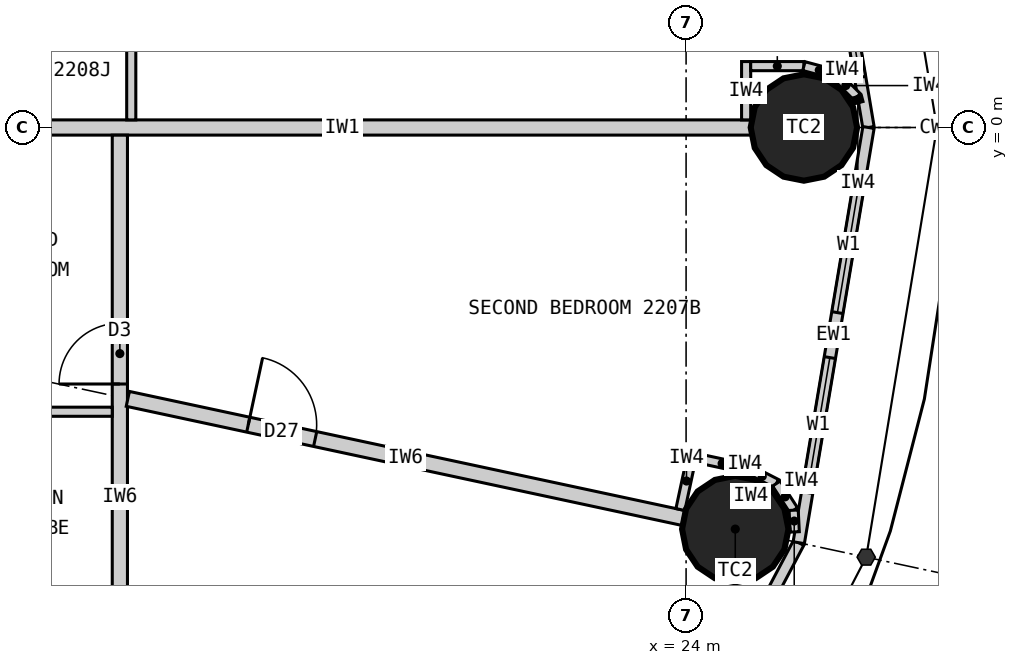
"""IFC4 building model, lengths in metres.
Left out: names, types, materials, properties, quantities, classifications, styles, units other than length and angle.
Written with IfcOpenShell. Run it as: python <this file> out.ifc"""

import sys

from ifc_helpers import new_model, si_unit, direction, frame, frame_2d, origin, origin_2d, place, context, subcontext, project, spatial, rectangle, circle, extrude, element, fill, save


model = new_model("IFC4")
c1 = context("Model", 3, precision=1e-05, world=origin(), true_north=direction((0.0, 1.0)))
c2 = subcontext(c1, "Body", "Model", "MODEL_VIEW")
j1 = project(units=[si_unit("LENGTHUNIT", "METRE"), si_unit("PLANEANGLEUNIT", "RADIAN")], contexts=[c1])
p1 = place(None, origin())
s1 = spatial("IfcSite", under=j1, at=p1, CompositionType="ELEMENT")
p2 = place(p1, origin())
s2 = spatial("IfcBuilding", under=s1, at=p2, CompositionType="ELEMENT")
p3 = place(p2, frame((0.0, 0.0, 87.0)))
s3 = spatial("IfcBuildingStorey", under=s2, at=p3, CompositionType="ELEMENT", Elevation=87.0)
for number, where, z_axis, x_axis in (
    (1, (25.55, 0.0, 0.0), (0.0, 0.0, 1.0), (1.0, 0.0, 0.0)),
    (2, (24.647, -5.283, 0.0), (0.0, 0.0, 1.0), (1.0, 0.0, 0.0)),
):
    element("IfcColumn", number, at=place(p3, frame(where, z_axis=z_axis, x_axis=x_axis)), inside=s3, PredefinedType="COLUMN", context=c2, shape_type="SweptSolid", body=[
        extrude(circle(Radius=0.7, at=origin_2d()), origin(), (0.0, 0.0, 1.0), 3.3),
    ])
p4 = place(p3, frame((26.4, 0.0, 0.0), z_axis=(0.0, 0.0, 1.0), x_axis=(-0.165642551694, 0.986185857264, 0.0)))
e3 = element("IfcWall", 3, at=p4, inside=s3, PredefinedType="ELEMENTEDWALL", context=c2, shape_type="SweptSolid", body=[
    extrude(rectangle(XDim=5.539, YDim=0.15, at=frame_2d((2.77, 0.0))), origin(), (0.0, 0.0, 1.0), 3.12),
])
p5 = place(p4, frame((0.669, 0.0, 0.9)))
e4 = element("IfcOpeningElement", 4, at=p5, cuts=e3, PredefinedType="OPENING", context=c2, shape_type="SweptSolid", body=[
    extrude(rectangle(XDim=1.8, YDim=1.9, at=frame_2d((0.9, 0.95))), frame((0.0, 0.085, 0.0), z_axis=(0.0, -1.0, 0.0), x_axis=(1.0, 0.0, 0.0)), (0.0, 0.0, 1.0), 0.17),
])
p6 = place(p4, frame((3.07, 0.0, 0.9)))
e5 = element("IfcOpeningElement", 5, at=p6, cuts=e3, PredefinedType="OPENING", context=c2, shape_type="SweptSolid", body=[
    extrude(rectangle(XDim=1.8, YDim=1.9, at=frame_2d((0.9, 0.95))), frame((0.0, 0.085, 0.0), z_axis=(0.0, -1.0, 0.0), x_axis=(1.0, 0.0, 0.0)), (0.0, 0.0, 1.0), 0.17),
])
p7 = place(p3, frame((22.803, -10.532, 0.0), z_axis=(0.0, 0.0, 1.0), x_axis=(0.467296867008, 0.884100468321, 0.0)))
e6 = element("IfcWall", 6, at=p7, inside=s3, PredefinedType="ELEMENTEDWALL", context=c2, shape_type="SweptSolid", body=[
    extrude(rectangle(XDim=5.734, YDim=0.15, at=frame_2d((2.867, 0.0))), origin(), (0.0, 0.0, 1.0), 3.12),
])
p8 = place(p7, frame((0.767, 0.0, 0.9)))
e7 = element("IfcOpeningElement", 7, at=p8, cuts=e6, PredefinedType="OPENING", context=c2, shape_type="SweptSolid", body=[
    extrude(rectangle(XDim=1.8, YDim=1.9, at=frame_2d((0.9, 0.95))), frame((0.0, 0.085, 0.0), z_axis=(0.0, -1.0, 0.0), x_axis=(1.0, 0.0, 0.0)), (0.0, 0.0, 1.0), 0.17),
])
p9 = place(p7, frame((3.167, 0.0, 0.9)))
e8 = element("IfcOpeningElement", 8, at=p9, cuts=e6, PredefinedType="OPENING", context=c2, shape_type="SweptSolid", body=[
    extrude(rectangle(XDim=1.8, YDim=1.9, at=frame_2d((0.9, 0.95))), frame((0.0, 0.085, 0.0), z_axis=(0.0, -1.0, 0.0), x_axis=(1.0, 0.0, 0.0)), (0.0, 0.0, 1.0), 0.17),
])
p10 = place(p3, frame((25.482, -5.462, 0.0), z_axis=(0.0, 0.0, 1.0), x_axis=(0.165642551694, 0.986185857264, 0.0)))
e9 = element("IfcWall", 9, at=p10, inside=s3, PredefinedType="ELEMENTEDWALL", context=c2, shape_type="SweptSolid", body=[
    extrude(rectangle(XDim=5.539, YDim=0.15, at=frame_2d((2.77, 0.0))), origin(), (0.0, 0.0, 1.0), 3.12),
])
p11 = place(p10, frame((0.669, 0.0, 0.9)))
e10 = element("IfcOpeningElement", 10, at=p11, cuts=e9, PredefinedType="OPENING", context=c2, shape_type="SweptSolid", body=[
    extrude(rectangle(XDim=1.8, YDim=1.9, at=frame_2d((0.9, 0.95))), frame((0.0, 0.085, 0.0), z_axis=(0.0, -1.0, 0.0), x_axis=(1.0, 0.0, 0.0)), (0.0, 0.0, 1.0), 0.17),
])
p12 = place(p10, frame((3.07, 0.0, 0.9)))
e11 = element("IfcOpeningElement", 11, at=p12, cuts=e9, PredefinedType="OPENING", context=c2, shape_type="SweptSolid", body=[
    extrude(rectangle(XDim=1.8, YDim=1.9, at=frame_2d((0.9, 0.95))), frame((0.0, 0.085, 0.0), z_axis=(0.0, -1.0, 0.0), x_axis=(1.0, 0.0, 0.0)), (0.0, 0.0, 1.0), 0.17),
])
p13 = place(p3, frame((14.1, 0.0, 0.0), z_axis=(0.0, 0.0, 1.0), x_axis=(1.0, 0.0, 0.0)))
e12 = element("IfcWall", 12, at=p13, inside=s3, PredefinedType="PARTITIONING", context=c2, shape_type="SweptSolid", body=[
    extrude(rectangle(XDim=10.75, YDim=0.2, at=frame_2d((5.375, 0.0))), origin(), (0.0, 0.0, 1.0), 2.22),
])
p14 = place(p3, frame((16.55, -9.609, 0.0), z_axis=(0.0, 0.0, 1.0), x_axis=(0.0, 1.0, 0.0)))
e13 = element("IfcWall", 13, at=p14, inside=s3, PredefinedType="PARTITIONING", context=c2, shape_type="SweptSolid", body=[
    extrude(rectangle(XDim=9.508, YDim=0.2, at=frame_2d((4.754, 0.0))), origin(), (0.0, 0.0, 1.0), 3.12),
])
p15 = place(p14, frame((6.234, 0.0, 0.0)))
e14 = element("IfcOpeningElement", 14, at=p15, cuts=e13, PredefinedType="OPENING", context=c2, shape_type="SweptSolid", body=[
    extrude(rectangle(XDim=0.8, YDim=2.1, at=frame_2d((0.4, 1.05))), frame((0.0, 0.11, 0.0), z_axis=(0.0, -1.0, 0.0), x_axis=(1.0, 0.0, 0.0)), (0.0, 0.0, 1.0), 0.22),
])
p16 = place(p3, frame((16.655, -3.57, 0.0), z_axis=(0.0, 0.0, 1.0), x_axis=(0.977790461522, -0.209584859557, 0.0)))
e15 = element("IfcWall", 15, at=p16, inside=s3, PredefinedType="PARTITIONING", context=c2, shape_type="SweptSolid", body=[
    extrude(rectangle(XDim=7.474, YDim=0.2, at=frame_2d((3.737, 0.0))), origin(), (0.0, 0.0, 1.0), 2.27),
])
p17 = place(p16, frame((1.621, 0.0, 0.0)))
e16 = element("IfcOpeningElement", 16, at=p17, cuts=e15, PredefinedType="OPENING", context=c2, shape_type="SweptSolid", body=[
    extrude(rectangle(XDim=0.9, YDim=2.1, at=frame_2d((0.45, 1.05))), frame((0.0, 0.11, 0.0), z_axis=(0.0, -1.0, 0.0), x_axis=(1.0, 0.0, 0.0)), (0.0, 0.0, 1.0), 0.22),
])
p18 = place(p3, frame((14.1, -3.74, 0.0), z_axis=(0.0, 0.0, 1.0), x_axis=(1.0, 0.0, 0.0)))
e17 = element("IfcWall", 17, at=p18, inside=s3, PredefinedType="PARTITIONING", context=c2, shape_type="SweptSolid", body=[
    extrude(rectangle(XDim=2.35, YDim=0.12, at=frame_2d((1.175, 0.0))), origin(), (0.0, 0.0, 1.0), 2.27),
])
p19 = place(p3, frame((16.7, 0.1, 0.0), z_axis=(0.0, 0.0, 1.0), x_axis=(0.0, 1.0, 0.0)))
e18 = element("IfcWall", 18, at=p19, inside=s3, PredefinedType="PARTITIONING", context=c2, shape_type="SweptSolid", body=[
    extrude(rectangle(XDim=2.34, YDim=0.12, at=frame_2d((1.17, 0.0))), origin(), (0.0, 0.0, 1.0), 3.12),
])
p20 = place(p3, frame((24.79, 0.1, 0.0), z_axis=(0.0, 0.0, 1.0), x_axis=(0.0, 1.0, 0.0)))
e19 = element("IfcWall", 19, at=p20, inside=s3, PredefinedType="PARTITIONING", context=c2, shape_type="SweptSolid", body=[
    extrude(rectangle(XDim=0.767, YDim=0.12, at=frame_2d((0.384, 0.0))), origin(), (0.0, 0.0, 1.0), 3.12),
])
p21 = place(p3, frame((24.85, 0.808, 0.0), z_axis=(0.0, 0.0, 1.0), x_axis=(1.0, 0.0, 0.0)))
e20 = element("IfcWall", 20, at=p21, inside=s3, PredefinedType="PARTITIONING", context=c2, shape_type="SweptSolid", body=[
    extrude(rectangle(XDim=0.7, YDim=0.12, at=frame_2d((0.35, 0.0))), origin(), (0.0, 0.0, 1.0), 3.12),
])
p22 = place(p3, frame((25.55, 0.808, 0.0), z_axis=(0.0, 0.0, 1.0), x_axis=(0.965807183573, -0.2592614205, 0.0)))
e21 = element("IfcWall", 21, at=p22, inside=s3, PredefinedType="PARTITIONING", context=c2, shape_type="SweptSolid", body=[
    extrude(rectangle(XDim=0.418, YDim=0.12, at=frame_2d((0.209, 0.0))), origin(), (0.0, 0.0, 1.0), 3.12),
])
p23 = place(p3, frame((25.954, 0.699, 0.0), z_axis=(0.0, 0.0, 1.0), x_axis=(0.707106781187, -0.707106781187, 0.0)))
e22 = element("IfcWall", 22, at=p23, inside=s3, PredefinedType="PARTITIONING", context=c2, shape_type="SweptSolid", body=[
    extrude(rectangle(XDim=0.418, YDim=0.12, at=frame_2d((0.209, 0.0))), origin(), (0.0, 0.0, 1.0), 3.12),
])
p24 = place(p3, frame((26.249, 0.404, 0.0), z_axis=(0.0, 0.0, 1.0), x_axis=(0.259754282609, -0.965674744759, 0.0)))
e23 = element("IfcWall", 23, at=p24, inside=s3, PredefinedType="PARTITIONING", context=c2, shape_type="SweptSolid", body=[
    extrude(rectangle(XDim=0.08, YDim=0.12, at=frame_2d((0.04, 0.0))), origin(), (0.0, 0.0, 1.0), 3.12),
])
p25 = place(p3, frame((23.925, -5.026, 0.0), z_axis=(0.0, 0.0, 1.0), x_axis=(0.209681192172, 0.977769808109, 0.0)))
e24 = element("IfcWall", 24, at=p25, inside=s3, PredefinedType="PARTITIONING", context=c2, shape_type="SweptSolid", body=[
    extrude(rectangle(XDim=0.767, YDim=0.12, at=frame_2d((0.384, 0.0))), origin(), (0.0, 0.0, 1.0), 3.12),
])
p26 = place(p3, frame((24.132, -4.347, 0.0), z_axis=(0.0, 0.0, 1.0), x_axis=(0.977776882509, -0.209648200638, 0.0)))
e25 = element("IfcWall", 25, at=p26, inside=s3, PredefinedType="PARTITIONING", context=c2, shape_type="SweptSolid", body=[
    extrude(rectangle(XDim=0.7, YDim=0.12, at=frame_2d((0.35, 0.0))), origin(), (0.0, 0.0, 1.0), 3.12),
])
for number, where, z_axis, x_axis in (
    (26, (24.816, -4.494, 0.0), (0.0, 0.0, 1.0), (0.89, -0.455, 0.0)),
    (27, (25.188, -4.684, 0.0), (0.0, 0.0, 1.0), (0.543, -0.84, 0.0)),
):
    element("IfcWall", number, at=place(p3, frame(where, z_axis=z_axis, x_axis=x_axis)), inside=s3, PredefinedType="PARTITIONING", context=c2, shape_type="SweptSolid", body=[
        extrude(rectangle(XDim=0.418, YDim=0.12, at=frame_2d((0.209, 0.0))), origin(), (0.0, 0.0, 1.0), 3.12),
    ])
p27 = place(p3, frame((25.416, -5.035, 0.0), z_axis=(0.0, 0.0, 1.0), x_axis=(0.050406329159, -0.998728793007, 0.0)))
e28 = element("IfcWall", 28, at=p27, inside=s3, PredefinedType="PARTITIONING", context=c2, shape_type="SweptSolid", body=[
    extrude(rectangle(XDim=0.286, YDim=0.12, at=frame_2d((0.143, 0.0))), origin(), (0.0, 0.0, 1.0), 3.12),
])
p28 = place(p5, origin())
e29 = element("IfcWindow", 29, at=p28, inside=s3, PartitioningType="SINGLE_PANEL", PredefinedType="WINDOW", context=c2, shape_type="SweptSolid", body=[
    extrude(rectangle(XDim=1.8, YDim=1.9, at=frame_2d((0.9, 0.95))), frame((0.0, 0.03, 0.0), z_axis=(0.0, -1.0, 0.0), x_axis=(1.0, 0.0, 0.0)), (0.0, 0.0, 1.0), 0.06),
])
fill(e4, e29)
p29 = place(p11, origin())
e30 = element("IfcWindow", 30, at=p29, inside=s3, PartitioningType="SINGLE_PANEL", PredefinedType="WINDOW", context=c2, shape_type="SweptSolid", body=[
    extrude(rectangle(XDim=1.8, YDim=1.9, at=frame_2d((0.9, 0.95))), frame((0.0, 0.03, 0.0), z_axis=(0.0, -1.0, 0.0), x_axis=(1.0, 0.0, 0.0)), (0.0, 0.0, 1.0), 0.06),
])
fill(e10, e30)
p30 = place(p12, origin())
e31 = element("IfcWindow", 31, at=p30, inside=s3, PartitioningType="SINGLE_PANEL", PredefinedType="WINDOW", context=c2, shape_type="SweptSolid", body=[
    extrude(rectangle(XDim=1.8, YDim=1.9, at=frame_2d((0.9, 0.95))), frame((0.0, 0.03, 0.0), z_axis=(0.0, -1.0, 0.0), x_axis=(1.0, 0.0, 0.0)), (0.0, 0.0, 1.0), 0.06),
])
fill(e11, e31)
p31 = place(p15, origin())
e32 = element("IfcDoor", 32, at=p31, inside=s3, OperationType="SINGLE_SWING_LEFT", PredefinedType="DOOR", context=c2, shape_type="SweptSolid", body=[
    extrude(rectangle(XDim=0.8, YDim=2.1, at=frame_2d((0.4, 1.05))), frame((0.0, 0.025, 0.0), z_axis=(0.0, -1.0, 0.0), x_axis=(1.0, 0.0, 0.0)), (0.0, 0.0, 1.0), 0.05),
])
fill(e14, e32)
p32 = place(p17, origin())
e33 = element("IfcDoor", 33, at=p32, inside=s3, OperationType="SINGLE_SWING_LEFT", PredefinedType="DOOR", context=c2, shape_type="SweptSolid", body=[
    extrude(rectangle(XDim=0.9, YDim=2.1, at=frame_2d((0.45, 1.05))), frame((0.0, 0.025, 0.0), z_axis=(0.0, -1.0, 0.0), x_axis=(1.0, 0.0, 0.0)), (0.0, 0.0, 1.0), 0.05),
])
fill(e16, e33)
save(model, sys.argv[1])
